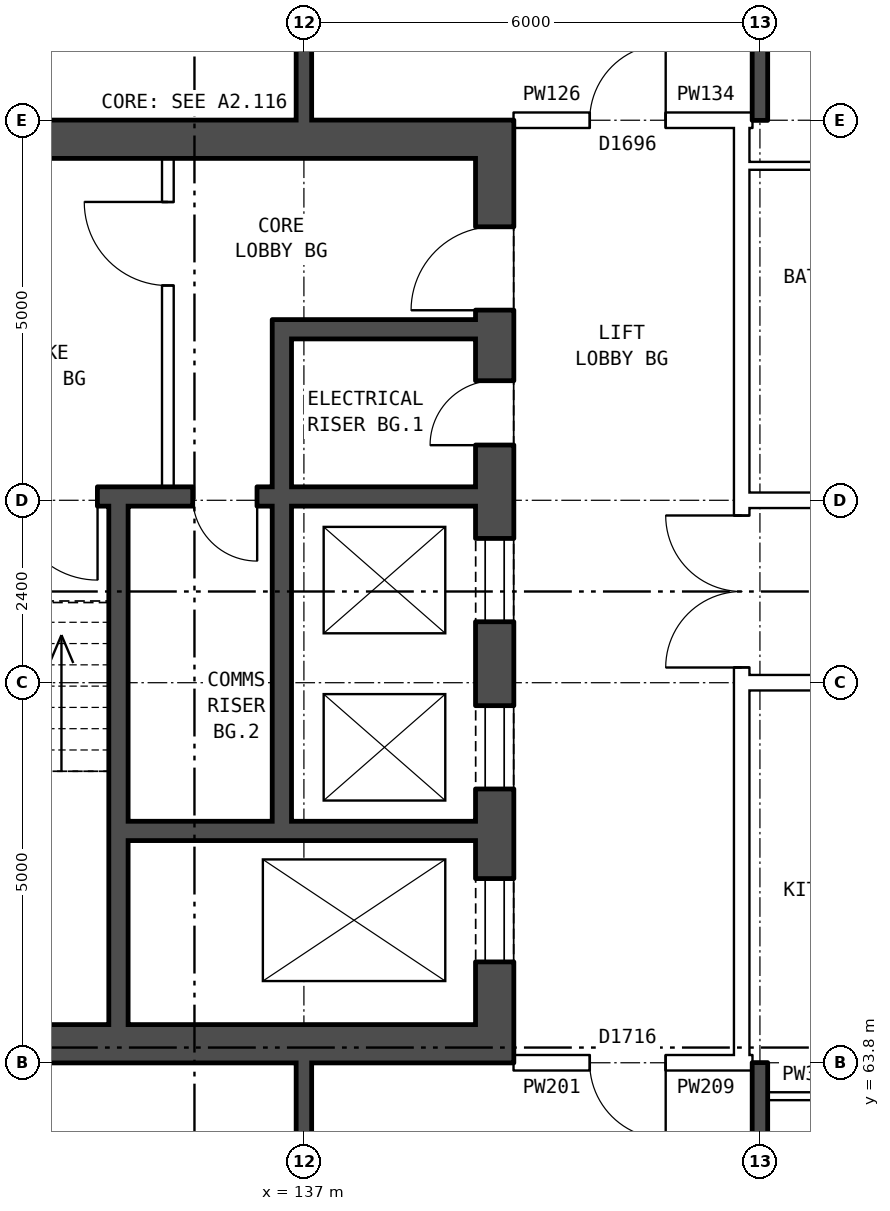
"""IFC4 building model, lengths in metres.
Left out: names, types, materials, properties, quantities, classifications, styles, units other than length and angle.
Written with IfcOpenShell. Run it as: python <this file> out.ifc"""

import sys

from ifc_helpers import new_model, si_unit, direction, frame, frame_2d, origin, place, context, subcontext, project, spatial, rectangle, extrude, element, fill, save


model = new_model("IFC4")
c1 = context("Model", 3, precision=1e-05, world=origin(), true_north=direction((0.0, 1.0)))
c2 = subcontext(c1, "Body", "Model", "MODEL_VIEW")
j1 = project(units=[si_unit("LENGTHUNIT", "METRE"), si_unit("PLANEANGLEUNIT", "RADIAN")], contexts=[c1])
p1 = place(None, origin())
s1 = spatial("IfcSite", under=j1, at=p1, CompositionType="ELEMENT")
p2 = place(p1, origin())
s2 = spatial("IfcBuilding", under=s1, at=p2, CompositionType="ELEMENT")
p3 = place(p2, frame((0.0, 0.0, 164.0)))
s3 = spatial("IfcBuildingStorey", under=s2, at=p3, CompositionType="ELEMENT", Elevation=164.0)
p4 = place(p3, frame((139.51, 63.8, 0.0), z_axis=(0.0, 0.0, 1.0), x_axis=(0.0, 1.0, 0.0)))
e1 = element("IfcWall", 1, at=p4, inside=s3, PredefinedType="SHEAR", context=c2, shape_type="SweptSolid", body=[
    extrude(rectangle(XDim=12.4, YDim=0.5, at=frame_2d((6.2, 0.0))), origin(), (0.0, 0.0, 1.0), 2.85),
])
p5 = place(p4, frame((1.325, 0.0, 0.0)))
e2 = element("IfcOpeningElement", 2, at=p5, cuts=e1, PredefinedType="OPENING", context=c2, shape_type="SweptSolid", body=[
    extrude(rectangle(XDim=1.1, YDim=2.1, at=frame_2d((0.55, 1.05))), frame((0.0, 0.26, 0.0), z_axis=(0.0, -1.0, 0.0), x_axis=(1.0, 0.0, 0.0)), (0.0, 0.0, 1.0), 0.52),
])
p6 = place(p4, frame((3.6, 0.0, 0.0)))
e3 = element("IfcOpeningElement", 3, at=p6, cuts=e1, PredefinedType="OPENING", context=c2, shape_type="SweptSolid", body=[
    extrude(rectangle(XDim=1.1, YDim=2.1, at=frame_2d((0.55, 1.05))), frame((0.0, 0.26, 0.0), z_axis=(0.0, -1.0, 0.0), x_axis=(1.0, 0.0, 0.0)), (0.0, 0.0, 1.0), 0.52),
])
p7 = place(p4, frame((5.8, 0.0, 0.0)))
e4 = element("IfcOpeningElement", 4, at=p7, cuts=e1, PredefinedType="OPENING", context=c2, shape_type="SweptSolid", body=[
    extrude(rectangle(XDim=1.1, YDim=2.1, at=frame_2d((0.55, 1.05))), frame((0.0, 0.26, 0.0), z_axis=(0.0, -1.0, 0.0), x_axis=(1.0, 0.0, 0.0)), (0.0, 0.0, 1.0), 0.52),
])
p8 = place(p4, frame((9.9, 0.0, 0.0)))
e5 = element("IfcOpeningElement", 5, at=p8, cuts=e1, PredefinedType="OPENING", context=c2, shape_type="SweptSolid", body=[
    extrude(rectangle(XDim=1.1, YDim=2.1, at=frame_2d((0.55, 1.05))), frame((0.0, 0.26, 0.0), z_axis=(0.0, -1.0, 0.0), x_axis=(1.0, 0.0, 0.0)), (0.0, 0.0, 1.0), 0.52),
])
p9 = place(p4, frame((8.125, 0.0, 0.0)))
e6 = element("IfcOpeningElement", 6, at=p9, cuts=e1, PredefinedType="OPENING", context=c2, shape_type="SweptSolid", body=[
    extrude(rectangle(XDim=0.85, YDim=2.1, at=frame_2d((0.425, 1.05))), frame((0.0, 0.26, 0.0), z_axis=(0.0, -1.0, 0.0), x_axis=(1.0, 0.0, 0.0)), (0.0, 0.0, 1.0), 0.52),
])
for number, where, z_axis, x_axis in (
    (7, (139.26, 64.05, 0.0), (0.0, 0.0, 1.0), (-1.0, 0.0, 0.0)),
    (8, (139.26, 75.95, 0.0), (0.0, 0.0, 1.0), (-1.0, 0.0, 0.0)),
):
    element("IfcWall", number, at=place(p3, frame(where, z_axis=z_axis, x_axis=x_axis)), inside=s3, PredefinedType="SHEAR", context=c2, shape_type="SweptSolid", body=[
        extrude(rectangle(XDim=7.4, YDim=0.5, at=frame_2d((3.7, 0.0))), origin(), (0.0, 0.0, 1.0), 2.85),
    ])
p10 = place(p3, frame((139.26, 66.85, 0.0), z_axis=(0.0, 0.0, 1.0), x_axis=(-1.0, 0.0, 0.0)))
e9 = element("IfcWall", 9, at=p10, inside=s3, PredefinedType="SHEAR", context=c2, shape_type="SweptSolid", body=[
    extrude(rectangle(XDim=4.575, YDim=0.25, at=frame_2d((2.288, 0.0))), origin(), (0.0, 0.0, 1.0), 2.85),
])
p11 = place(p3, frame((139.26, 71.25, 0.0), z_axis=(0.0, 0.0, 1.0), x_axis=(-1.0, 0.0, 0.0)))
e10 = element("IfcWall", 10, at=p11, inside=s3, PredefinedType="SHEAR", context=c2, shape_type="SweptSolid", body=[
    extrude(rectangle(XDim=7.4, YDim=0.25, at=frame_2d((3.7, 0.0))), origin(), (0.0, 0.0, 1.0), 2.85),
])
p12 = place(p11, frame((4.975, 0.0, 0.0)))
e11 = element("IfcOpeningElement", 11, at=p12, cuts=e10, PredefinedType="OPENING", context=c2, shape_type="SweptSolid", body=[
    extrude(rectangle(XDim=1.1, YDim=2.1, at=frame_2d((0.55, 1.05))), frame((0.0, 0.135, 0.0), z_axis=(0.0, -1.0, 0.0), x_axis=(1.0, 0.0, 0.0)), (0.0, 0.0, 1.0), 0.27),
])
p13 = place(p11, frame((2.875, 0.0, 0.0)))
e12 = element("IfcOpeningElement", 12, at=p13, cuts=e10, PredefinedType="OPENING", context=c2, shape_type="SweptSolid", body=[
    extrude(rectangle(XDim=0.85, YDim=2.1, at=frame_2d((0.425, 1.05))), frame((0.0, 0.135, 0.0), z_axis=(0.0, -1.0, 0.0), x_axis=(1.0, 0.0, 0.0)), (0.0, 0.0, 1.0), 0.27),
])
p14 = place(p3, frame((139.26, 73.45, 0.0), z_axis=(0.0, 0.0, 1.0), x_axis=(-1.0, 0.0, 0.0)))
e13 = element("IfcWall", 13, at=p14, inside=s3, PredefinedType="SHEAR", context=c2, shape_type="SweptSolid", body=[
    extrude(rectangle(XDim=2.425, YDim=0.25, at=frame_2d((1.212, 0.0))), origin(), (0.0, 0.0, 1.0), 2.85),
])
p15 = place(p3, frame((136.71, 66.975, 0.0), z_axis=(0.0, 0.0, 1.0), x_axis=(0.0, 1.0, 0.0)))
e14 = element("IfcWall", 14, at=p15, inside=s3, PredefinedType="SHEAR", context=c2, shape_type="SweptSolid", body=[
    extrude(rectangle(XDim=4.15, YDim=0.25, at=frame_2d((2.075, 0.0))), origin(), (0.0, 0.0, 1.0), 2.85),
])
p16 = place(p3, frame((136.71, 71.375, 0.0), z_axis=(0.0, 0.0, 1.0), x_axis=(0.0, 1.0, 0.0)))
e15 = element("IfcWall", 15, at=p16, inside=s3, PredefinedType="SHEAR", context=c2, shape_type="SweptSolid", body=[
    extrude(rectangle(XDim=2.2, YDim=0.25, at=frame_2d((1.1, 0.0))), origin(), (0.0, 0.0, 1.0), 2.85),
])
p17 = place(p3, frame((135.21, 71.375, 0.0), z_axis=(0.0, 0.0, 1.0), x_axis=(0.0, 1.0, 0.0)))
e16 = element("IfcWall", 16, at=p17, inside=s3, PredefinedType="PARTITIONING", context=c2, shape_type="SweptSolid", body=[
    extrude(rectangle(XDim=4.325, YDim=0.15, at=frame_2d((2.163, 0.0))), origin(), (0.0, 0.0, 1.0), 2.85),
])
p18 = place(p17, frame((2.65, 0.0, 0.0)))
e17 = element("IfcOpeningElement", 17, at=p18, cuts=e16, PredefinedType="OPENING", context=c2, shape_type="SweptSolid", body=[
    extrude(rectangle(XDim=1.1, YDim=2.1, at=frame_2d((0.55, 1.05))), frame((0.0, 0.085, 0.0), z_axis=(0.0, -1.0, 0.0), x_axis=(1.0, 0.0, 0.0)), (0.0, 0.0, 1.0), 0.17),
])
p19 = place(p3, frame((134.56, 64.3, 0.0), z_axis=(0.0, 0.0, 1.0), x_axis=(0.0, 1.0, 0.0)))
e18 = element("IfcWall", 18, at=p19, inside=s3, PredefinedType="SHEAR", context=c2, shape_type="SweptSolid", body=[
    extrude(rectangle(XDim=6.825, YDim=0.25, at=frame_2d((3.413, 0.0))), origin(), (0.0, 0.0, 1.0), 2.85),
])
p20 = place(p3, frame((142.76, 63.9, 0.0), z_axis=(0.0, 0.0, 1.0), x_axis=(0.0, 1.0, 0.0)))
e19 = element("IfcWall", 19, at=p20, inside=s3, PredefinedType="PARTITIONING", context=c2, shape_type="SweptSolid", body=[
    extrude(rectangle(XDim=12.2, YDim=0.2, at=frame_2d((6.1, 0.0))), origin(), (0.0, 0.0, 1.0), 2.85),
])
p21 = place(p20, frame((5.1, 0.0, 0.0)))
e20 = element("IfcOpeningElement", 20, at=p21, cuts=e19, PredefinedType="OPENING", context=c2, shape_type="SweptSolid", body=[
    extrude(rectangle(XDim=2.0, YDim=2.1, at=frame_2d((1.0, 1.05))), frame((0.0, 0.11, 0.0), z_axis=(0.0, -1.0, 0.0), x_axis=(1.0, 0.0, 0.0)), (0.0, 0.0, 1.0), 0.22),
])
p22 = place(p3, frame((143.1, 63.36, 0.0), z_axis=(0.0, 0.0, 1.0), x_axis=(1.0, 0.0, 0.0)))
e21 = element("IfcWall", 21, at=p22, inside=s3, PredefinedType="PARTITIONING", context=c2, shape_type="SweptSolid", body=[
    extrude(rectangle(XDim=2.9, YDim=0.1, at=frame_2d((1.45, 0.0))), origin(), (0.0, 0.0, 1.0), 2.85),
])
p23 = place(p22, frame((1.0, 0.0, 0.0)))
e22 = element("IfcOpeningElement", 22, at=p23, cuts=e21, PredefinedType="OPENING", context=c2, shape_type="SweptSolid", body=[
    extrude(rectangle(XDim=0.9, YDim=2.1, at=frame_2d((0.45, 1.05))), frame((0.0, 0.06, 0.0), z_axis=(0.0, -1.0, 0.0), x_axis=(1.0, 0.0, 0.0)), (0.0, 0.0, 1.0), 0.12),
])
p24 = place(p3, frame((139.76, 63.8, 0.0), z_axis=(0.0, 0.0, 1.0), x_axis=(1.0, 0.0, 0.0)))
e23 = element("IfcWall", 23, at=p24, inside=s3, PredefinedType="PARTITIONING", context=c2, shape_type="SweptSolid", body=[
    extrude(rectangle(XDim=3.0, YDim=0.2, at=frame_2d((1.5, 0.0))), origin(), (0.0, 0.0, 1.0), 2.85),
])
p25 = place(p24, frame((1.0, 0.0, 0.0)))
e24 = element("IfcOpeningElement", 24, at=p25, cuts=e23, PredefinedType="OPENING", context=c2, shape_type="SweptSolid", body=[
    extrude(rectangle(XDim=1.0, YDim=2.1, at=frame_2d((0.5, 1.05))), frame((0.0, 0.11, 0.0), z_axis=(0.0, -1.0, 0.0), x_axis=(1.0, 0.0, 0.0)), (0.0, 0.0, 1.0), 0.22),
])
p26 = place(p3, frame((142.76, 63.8, 0.0), z_axis=(0.0, 0.0, 1.0), x_axis=(1.0, 0.0, 0.0)))
e25 = element("IfcWall", 25, at=p26, inside=s3, PredefinedType="PARTITIONING", context=c2, shape_type="SweptSolid", body=[
    extrude(rectangle(XDim=0.14, YDim=0.2, at=frame_2d((0.07, 0.0))), origin(), (0.0, 0.0, 1.0), 2.85),
])
p27 = place(p3, frame((142.76, 68.8, 0.0), z_axis=(0.0, 0.0, 1.0), x_axis=(1.0, 0.0, 0.0)))
e26 = element("IfcWall", 26, at=p27, inside=s3, PredefinedType="PARTITIONING", context=c2, shape_type="SweptSolid", body=[
    extrude(rectangle(XDim=14.48, YDim=0.2, at=frame_2d((7.24, 0.0))), origin(), (0.0, 0.0, 1.0), 2.85),
])
p28 = place(p27, frame((1.12, 0.0, 0.0)))
e27 = element("IfcOpeningElement", 27, at=p28, cuts=e26, PredefinedType="OPENING", context=c2, shape_type="SweptSolid", body=[
    extrude(rectangle(XDim=1.0, YDim=2.1, at=frame_2d((0.5, 1.05))), frame((0.0, 0.11, 0.0), z_axis=(0.0, -1.0, 0.0), x_axis=(1.0, 0.0, 0.0)), (0.0, 0.0, 1.0), 0.22),
])
p29 = place(p27, frame((7.24, 0.0, 0.0)))
e28 = element("IfcOpeningElement", 28, at=p29, cuts=e26, PredefinedType="OPENING", context=c2, shape_type="SweptSolid", body=[
    extrude(rectangle(XDim=1.0, YDim=2.1, at=frame_2d((0.5, 1.05))), frame((0.0, 0.11, 0.0), z_axis=(0.0, -1.0, 0.0), x_axis=(1.0, 0.0, 0.0)), (0.0, 0.0, 1.0), 0.22),
])
p30 = place(p3, frame((142.76, 71.2, 0.0), z_axis=(0.0, 0.0, 1.0), x_axis=(1.0, 0.0, 0.0)))
e29 = element("IfcWall", 29, at=p30, inside=s3, PredefinedType="PARTITIONING", context=c2, shape_type="SweptSolid", body=[
    extrude(rectangle(XDim=14.48, YDim=0.2, at=frame_2d((7.24, 0.0))), origin(), (0.0, 0.0, 1.0), 2.85),
])
p31 = place(p30, frame((4.24, 0.0, 0.0)))
e30 = element("IfcOpeningElement", 30, at=p31, cuts=e29, PredefinedType="OPENING", context=c2, shape_type="SweptSolid", body=[
    extrude(rectangle(XDim=1.0, YDim=2.1, at=frame_2d((0.5, 1.05))), frame((0.0, 0.11, 0.0), z_axis=(0.0, -1.0, 0.0), x_axis=(1.0, 0.0, 0.0)), (0.0, 0.0, 1.0), 0.22),
])
p32 = place(p30, frame((7.24, 0.0, 0.0)))
e31 = element("IfcOpeningElement", 31, at=p32, cuts=e29, PredefinedType="OPENING", context=c2, shape_type="SweptSolid", body=[
    extrude(rectangle(XDim=1.0, YDim=2.1, at=frame_2d((0.5, 1.05))), frame((0.0, 0.11, 0.0), z_axis=(0.0, -1.0, 0.0), x_axis=(1.0, 0.0, 0.0)), (0.0, 0.0, 1.0), 0.22),
])
p33 = place(p3, frame((142.76, 75.6, 0.0), z_axis=(0.0, 0.0, 1.0), x_axis=(1.0, 0.0, 0.0)))
e32 = element("IfcWall", 32, at=p33, inside=s3, PredefinedType="PARTITIONING", context=c2, shape_type="SweptSolid", body=[
    extrude(rectangle(XDim=3.24, YDim=0.1, at=frame_2d((1.62, 0.0))), origin(), (0.0, 0.0, 1.0), 2.85),
])
p34 = place(p3, frame((139.76, 76.2, 0.0), z_axis=(0.0, 0.0, 1.0), x_axis=(1.0, 0.0, 0.0)))
e33 = element("IfcWall", 33, at=p34, inside=s3, PredefinedType="PARTITIONING", context=c2, shape_type="SweptSolid", body=[
    extrude(rectangle(XDim=3.0, YDim=0.2, at=frame_2d((1.5, 0.0))), origin(), (0.0, 0.0, 1.0), 2.85),
])
p35 = place(p34, frame((1.0, 0.0, 0.0)))
e34 = element("IfcOpeningElement", 34, at=p35, cuts=e33, PredefinedType="OPENING", context=c2, shape_type="SweptSolid", body=[
    extrude(rectangle(XDim=1.0, YDim=2.1, at=frame_2d((0.5, 1.05))), frame((0.0, 0.11, 0.0), z_axis=(0.0, -1.0, 0.0), x_axis=(1.0, 0.0, 0.0)), (0.0, 0.0, 1.0), 0.22),
])
p36 = place(p3, frame((142.76, 76.2, 0.0), z_axis=(0.0, 0.0, 1.0), x_axis=(1.0, 0.0, 0.0)))
e35 = element("IfcWall", 35, at=p36, inside=s3, PredefinedType="PARTITIONING", context=c2, shape_type="SweptSolid", body=[
    extrude(rectangle(XDim=0.14, YDim=0.2, at=frame_2d((0.07, 0.0))), origin(), (0.0, 0.0, 1.0), 2.85),
])
p37 = place(p3, frame((137.0, 54.36, 0.0), z_axis=(0.0, 0.0, 1.0), x_axis=(0.0, 1.0, 0.0)))
e36 = element("IfcWall", 36, at=p37, inside=s3, PredefinedType="SOLIDWALL", context=c2, shape_type="SweptSolid", body=[
    extrude(rectangle(XDim=9.44, YDim=0.2, at=frame_2d((4.72, 0.0))), origin(), (0.0, 0.0, 1.0), 2.85),
])
p38 = place(p37, frame((2.47, 0.0, 0.0)))
e37 = element("IfcOpeningElement", 37, at=p38, cuts=e36, PredefinedType="OPENING", context=c2, shape_type="SweptSolid", body=[
    extrude(rectangle(XDim=0.9, YDim=2.1, at=frame_2d((0.45, 1.05))), frame((0.0, 0.11, 0.0), z_axis=(0.0, -1.0, 0.0), x_axis=(1.0, 0.0, 0.0)), (0.0, 0.0, 1.0), 0.22),
])
p39 = place(p37, frame((7.59, 0.0, 0.0)))
e38 = element("IfcOpeningElement", 38, at=p39, cuts=e36, PredefinedType="OPENING", context=c2, shape_type="SweptSolid", body=[
    extrude(rectangle(XDim=0.9, YDim=2.1, at=frame_2d((0.45, 1.05))), frame((0.0, 0.11, 0.0), z_axis=(0.0, -1.0, 0.0), x_axis=(1.0, 0.0, 0.0)), (0.0, 0.0, 1.0), 0.22),
])
p40 = place(p3, frame((137.0, 76.2, 0.0), z_axis=(0.0, 0.0, 1.0), x_axis=(0.0, 1.0, 0.0)))
e39 = element("IfcWall", 39, at=p40, inside=s3, PredefinedType="SOLIDWALL", context=c2, shape_type="SweptSolid", body=[
    extrude(rectangle(XDim=9.44, YDim=0.2, at=frame_2d((4.72, 0.0))), origin(), (0.0, 0.0, 1.0), 2.85),
])
p41 = place(p40, frame((1.35, 0.0, 0.0)))
e40 = element("IfcOpeningElement", 40, at=p41, cuts=e39, PredefinedType="OPENING", context=c2, shape_type="SweptSolid", body=[
    extrude(rectangle(XDim=0.9, YDim=2.1, at=frame_2d((0.45, 1.05))), frame((0.0, 0.11, 0.0), z_axis=(0.0, -1.0, 0.0), x_axis=(1.0, 0.0, 0.0)), (0.0, 0.0, 1.0), 0.22),
])
for number, where, z_axis, x_axis in (
    (41, (143.0, 54.36, 0.0), (0.0, 0.0, 1.0), (0.0, 1.0, 0.0)),
    (42, (143.0, 76.2, 0.0), (0.0, 0.0, 1.0), (0.0, 1.0, 0.0)),
):
    element("IfcWall", number, at=place(p3, frame(where, z_axis=z_axis, x_axis=x_axis)), inside=s3, PredefinedType="SOLIDWALL", context=c2, shape_type="SweptSolid", body=[
        extrude(rectangle(XDim=9.44, YDim=0.2, at=frame_2d((4.72, 0.0))), origin(), (0.0, 0.0, 1.0), 2.85),
    ])
p42 = place(p5, origin())
e43 = element("IfcDoor", 43, at=p42, inside=s3, OperationType="DOUBLE_DOOR_SLIDING", PredefinedType="DOOR", context=c2, shape_type="SweptSolid", body=[
    extrude(rectangle(XDim=1.1, YDim=2.1, at=frame_2d((0.55, 1.05))), frame((0.0, 0.235, 0.0), z_axis=(0.0, -1.0, 0.0), x_axis=(1.0, 0.0, 0.0)), (0.0, 0.0, 1.0), 0.05),
])
fill(e2, e43)
p43 = place(p6, origin())
e44 = element("IfcDoor", 44, at=p43, inside=s3, OperationType="DOUBLE_DOOR_SLIDING", PredefinedType="DOOR", context=c2, shape_type="SweptSolid", body=[
    extrude(rectangle(XDim=1.1, YDim=2.1, at=frame_2d((0.55, 1.05))), frame((0.0, 0.235, 0.0), z_axis=(0.0, -1.0, 0.0), x_axis=(1.0, 0.0, 0.0)), (0.0, 0.0, 1.0), 0.05),
])
fill(e3, e44)
p44 = place(p7, origin())
e45 = element("IfcDoor", 45, at=p44, inside=s3, OperationType="DOUBLE_DOOR_SLIDING", PredefinedType="DOOR", context=c2, shape_type="SweptSolid", body=[
    extrude(rectangle(XDim=1.1, YDim=2.1, at=frame_2d((0.55, 1.05))), frame((0.0, 0.235, 0.0), z_axis=(0.0, -1.0, 0.0), x_axis=(1.0, 0.0, 0.0)), (0.0, 0.0, 1.0), 0.05),
])
fill(e4, e45)
p45 = place(p8, origin())
e46 = element("IfcDoor", 46, at=p45, inside=s3, OperationType="SINGLE_SWING_LEFT", PredefinedType="DOOR", context=c2, shape_type="SweptSolid", body=[
    extrude(rectangle(XDim=1.1, YDim=2.1, at=frame_2d((0.55, 1.05))), frame((0.0, 0.235, 0.0), z_axis=(0.0, -1.0, 0.0), x_axis=(1.0, 0.0, 0.0)), (0.0, 0.0, 1.0), 0.05),
])
fill(e5, e46)
p46 = place(p18, origin())
e47 = element("IfcDoor", 47, at=p46, inside=s3, OperationType="SINGLE_SWING_RIGHT", PredefinedType="DOOR", context=c2, shape_type="SweptSolid", body=[
    extrude(rectangle(XDim=1.1, YDim=2.1, at=frame_2d((0.55, 1.05))), frame((0.0, 0.025, 0.0), z_axis=(0.0, -1.0, 0.0), x_axis=(1.0, 0.0, 0.0)), (0.0, 0.0, 1.0), 0.05),
])
fill(e17, e47)
p47 = place(p12, origin())
e48 = element("IfcDoor", 48, at=p47, inside=s3, OperationType="SINGLE_SWING_LEFT", PredefinedType="DOOR", context=c2, shape_type="SweptSolid", body=[
    extrude(rectangle(XDim=1.1, YDim=2.1, at=frame_2d((0.55, 1.05))), frame((0.0, 0.025, 0.0), z_axis=(0.0, -1.0, 0.0), x_axis=(1.0, 0.0, 0.0)), (0.0, 0.0, 1.0), 0.05),
])
fill(e11, e48)
p48 = place(p9, origin())
e49 = element("IfcDoor", 49, at=p48, inside=s3, OperationType="SINGLE_SWING_LEFT", PredefinedType="DOOR", context=c2, shape_type="SweptSolid", body=[
    extrude(rectangle(XDim=0.85, YDim=2.1, at=frame_2d((0.425, 1.05))), frame((0.0, 0.235, 0.0), z_axis=(0.0, -1.0, 0.0), x_axis=(1.0, 0.0, 0.0)), (0.0, 0.0, 1.0), 0.05),
])
fill(e6, e49)
p49 = place(p13, origin())
e50 = element("IfcDoor", 50, at=p49, inside=s3, OperationType="SINGLE_SWING_LEFT", PredefinedType="DOOR", context=c2, shape_type="SweptSolid", body=[
    extrude(rectangle(XDim=0.85, YDim=2.1, at=frame_2d((0.425, 1.05))), frame((0.0, 0.025, 0.0), z_axis=(0.0, -1.0, 0.0), x_axis=(1.0, 0.0, 0.0)), (0.0, 0.0, 1.0), 0.05),
])
fill(e12, e50)
p50 = place(p21, origin())
e51 = element("IfcDoor", 51, at=p50, inside=s3, OperationType="DOUBLE_DOOR_SINGLE_SWING", PredefinedType="DOOR", context=c2, shape_type="SweptSolid", body=[
    extrude(rectangle(XDim=2.0, YDim=2.1, at=frame_2d((1.0, 1.05))), frame((0.0, 0.025, 0.0), z_axis=(0.0, -1.0, 0.0), x_axis=(1.0, 0.0, 0.0)), (0.0, 0.0, 1.0), 0.05),
])
fill(e20, e51)
p51 = place(p25, frame((1.0, 0.0, 0.0), z_axis=(0.0, 0.0, 1.0), x_axis=(-1.0, 0.0, 0.0)))
e52 = element("IfcDoor", 52, at=p51, inside=s3, OperationType="SINGLE_SWING_LEFT", PredefinedType="DOOR", context=c2, shape_type="SweptSolid", body=[
    extrude(rectangle(XDim=1.0, YDim=2.1, at=frame_2d((0.5, 1.05))), frame((0.0, 0.025, 0.0), z_axis=(0.0, -1.0, 0.0), x_axis=(1.0, 0.0, 0.0)), (0.0, 0.0, 1.0), 0.05),
])
fill(e24, e52)
p52 = place(p35, origin())
e53 = element("IfcDoor", 53, at=p52, inside=s3, OperationType="SINGLE_SWING_RIGHT", PredefinedType="DOOR", context=c2, shape_type="SweptSolid", body=[
    extrude(rectangle(XDim=1.0, YDim=2.1, at=frame_2d((0.5, 1.05))), frame((0.0, 0.025, 0.0), z_axis=(0.0, -1.0, 0.0), x_axis=(1.0, 0.0, 0.0)), (0.0, 0.0, 1.0), 0.05),
])
fill(e34, e53)
save(model, sys.argv[1])
